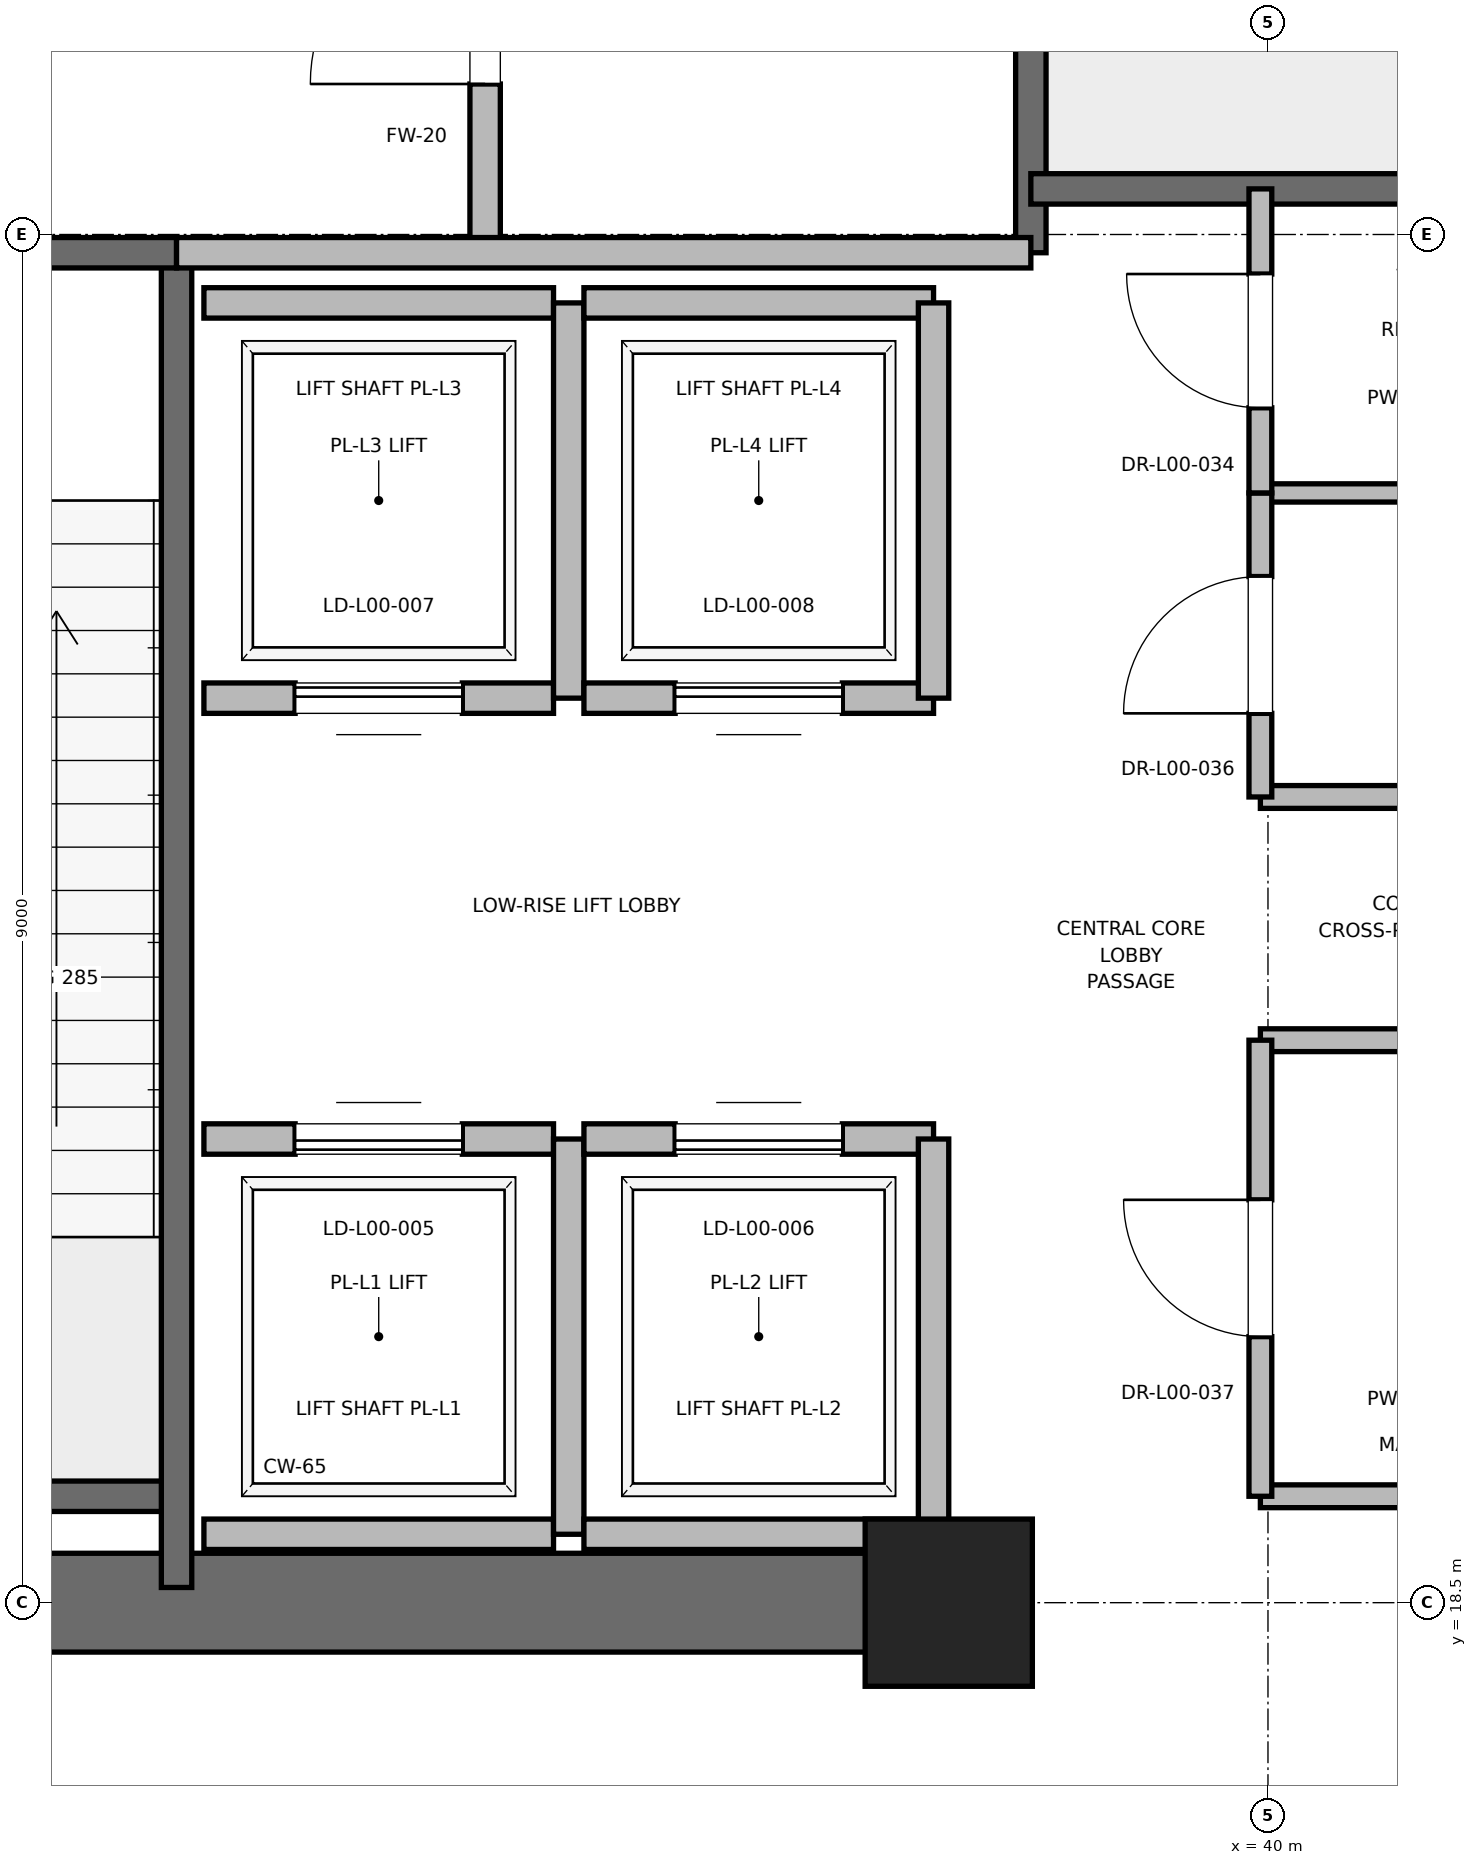
"""IFC4 building model, lengths in metres.
Left out: names, types, materials, properties, quantities, classifications, styles, units other than length and angle.
Written with IfcOpenShell. Run it as: python <this file> out.ifc"""

import sys

from ifc_helpers import new_model, si_unit, direction, frame, frame_2d, origin, origin_2d, place, context, subcontext, project, spatial, rectangle, extrude, element, fill, save


model = new_model("IFC4")
c1 = context("Model", 3, precision=1e-05, world=origin(), true_north=direction((0.0, 1.0)))
c2 = subcontext(c1, "Body", "Model", "MODEL_VIEW")
j1 = project(units=[si_unit("LENGTHUNIT", "METRE"), si_unit("PLANEANGLEUNIT", "RADIAN")], contexts=[c1])
p1 = place(None, origin())
s1 = spatial("IfcSite", under=j1, at=p1, CompositionType="ELEMENT")
p2 = place(p1, origin())
s2 = spatial("IfcBuilding", under=s1, at=p2, CompositionType="ELEMENT")
p3 = place(p2, origin())
s3 = spatial("IfcBuildingStorey", under=s2, at=p3, CompositionType="ELEMENT", Elevation=0.0)
p4 = place(p3, frame((37.9, 18.5, 0.0), z_axis=(0.0, 0.0, 1.0), x_axis=(1.0, 0.0, 0.0)))
e1 = element("IfcColumn", 1, at=p4, inside=s3, PredefinedType="PILASTER", context=c2, shape_type="SweptSolid", body=[
    extrude(rectangle(XDim=1.1, YDim=1.1, at=origin_2d()), origin(), (0.0, 0.0, 1.0), 6.0),
])
p5 = place(p3, frame((29.0, 18.5, 0.0), z_axis=(0.0, 0.0, 1.0), x_axis=(1.0, 0.0, 0.0)))
e2 = element("IfcWall", 2, at=p5, inside=s3, PredefinedType="SHEAR", context=c2, shape_type="SweptSolid", body=[
    extrude(rectangle(XDim=9.2, YDim=0.65, at=frame_2d((4.6, 0.0))), origin(), (0.0, 0.0, 1.0), 5.72),
])
p6 = place(p3, frame((29.7, 19.2, 0.0), z_axis=(0.0, 0.0, 1.0), x_axis=(1.0, 0.0, 0.0)))
e3 = element("IfcWall", 3, at=p6, inside=s3, PredefinedType="SOLIDWALL", context=c2, shape_type="SweptSolid", body=[
    extrude(rectangle(XDim=3.12, YDim=0.2, at=frame_2d((1.56, 0.0))), origin(), (0.0, 0.0, 1.0), 5.72),
])
p7 = place(p3, frame((32.82, 18.6, 0.0), z_axis=(0.0, 0.0, 1.0), x_axis=(0.0, 1.0, 0.0)))
e4 = element("IfcWall", 4, at=p7, inside=s3, PredefinedType="SOLIDWALL", context=c2, shape_type="SweptSolid", body=[
    extrude(rectangle(XDim=8.78, YDim=0.2, at=frame_2d((4.39, 0.0))), origin(), (0.0, 0.0, 1.0), 5.72),
])
p8 = place(p3, frame((29.7, 27.38, 0.0), z_axis=(0.0, 0.0, 1.0), x_axis=(1.0, 0.0, 0.0)))
e5 = element("IfcWall", 5, at=p8, inside=s3, PredefinedType="SOLIDWALL", context=c2, shape_type="SweptSolid", body=[
    extrude(rectangle(XDim=3.12, YDim=0.2, at=frame_2d((1.56, 0.0))), origin(), (0.0, 0.0, 1.0), 5.72),
])
p9 = place(p8, frame((1.01, 0.0, 0.0)))
e6 = element("IfcOpeningElement", 6, at=p9, cuts=e5, PredefinedType="OPENING", context=c2, shape_type="SweptSolid", body=[
    extrude(rectangle(XDim=1.1, YDim=2.15, at=frame_2d((0.55, 1.075))), frame((0.0, 0.1, 0.0), z_axis=(0.0, -1.0, 0.0), x_axis=(1.0, 0.0, 0.0)), (0.0, 0.0, 1.0), 0.2),
])
p10 = place(p3, frame((38.44, 27.38, 0.0), z_axis=(0.0, 0.0, 1.0), x_axis=(0.0, 1.0, 0.0)))
e7 = element("IfcWall", 7, at=p10, inside=s3, PredefinedType="SOLIDWALL", context=c2, shape_type="SweptSolid", body=[
    extrude(rectangle(XDim=8.87, YDim=0.2, at=frame_2d((4.435, 0.0))), origin(), (0.0, 0.0, 1.0), 5.72),
])
p11 = place(p3, frame((38.44, 27.8, 0.0), z_axis=(0.0, 0.0, 1.0), x_axis=(1.0, 0.0, 0.0)))
e8 = element("IfcWall", 8, at=p11, inside=s3, PredefinedType="SOLIDWALL", context=c2, shape_type="SweptSolid", body=[
    extrude(rectangle(XDim=3.32, YDim=0.2, at=frame_2d((1.66, 0.0))), origin(), (0.0, 0.0, 1.0), 5.72),
])
p12 = place(p3, frame((34.85, 27.38, 0.0), z_axis=(0.0, 0.0, 1.0), x_axis=(0.0, 1.0, 0.0)))
e9 = element("IfcWall", 9, at=p12, inside=s3, PredefinedType="PARTITIONING", context=c2, shape_type="SweptSolid", body=[
    extrude(rectangle(XDim=3.37, YDim=0.2, at=frame_2d((1.685, 0.0))), origin(), (0.0, 0.0, 1.0), 5.72),
])
p13 = place(p12, frame((1.11, 0.0, 0.0)))
e10 = element("IfcOpeningElement", 10, at=p13, cuts=e9, PredefinedType="OPENING", context=c2, shape_type="SweptSolid", body=[
    extrude(rectangle(XDim=1.15, YDim=2.2, at=frame_2d((0.575, 1.1))), frame((0.0, 0.1, 0.0), z_axis=(0.0, -1.0, 0.0), x_axis=(1.0, 0.0, 0.0)), (0.0, 0.0, 1.0), 0.2),
])
p14 = place(p3, frame((32.82, 27.38, 0.0), z_axis=(0.0, 0.0, 1.0), x_axis=(1.0, 0.0, 0.0)))
e11 = element("IfcWall", 11, at=p14, inside=s3, PredefinedType="PARTITIONING", context=c2, shape_type="SweptSolid", body=[
    extrude(rectangle(XDim=5.62, YDim=0.2, at=frame_2d((2.81, 0.0))), origin(), (0.0, 0.0, 1.0), 5.72),
])
p15 = place(p3, frame((33.0, 18.95, 0.0), z_axis=(0.0, 0.0, 1.0), x_axis=(1.0, 0.0, 0.0)))
e12 = element("IfcWall", 12, at=p15, inside=s3, PredefinedType="SOLIDWALL", context=c2, shape_type="SweptSolid", body=[
    extrude(rectangle(XDim=2.3, YDim=0.2, at=frame_2d((1.15, 0.0))), origin(), (0.0, 0.0, 1.0), 5.72),
])
p16 = place(p3, frame((35.3, 21.55, 0.0), z_axis=(0.0, 0.0, 1.0), x_axis=(-1.0, 0.0, 0.0)))
e13 = element("IfcWall", 13, at=p16, inside=s3, PredefinedType="SOLIDWALL", context=c2, shape_type="SweptSolid", body=[
    extrude(rectangle(XDim=2.3, YDim=0.2, at=frame_2d((1.15, 0.0))), origin(), (0.0, 0.0, 1.0), 5.72),
])
p17 = place(p16, frame((0.6, 0.0, 0.0)))
e14 = element("IfcOpeningElement", 14, at=p17, cuts=e13, PredefinedType="OPENING", context=c2, shape_type="SweptSolid", body=[
    extrude(rectangle(XDim=1.1, YDim=2.2, at=frame_2d((0.55, 1.1))), frame((0.0, 0.1, 0.0), z_axis=(0.0, -1.0, 0.0), x_axis=(1.0, 0.0, 0.0)), (0.0, 0.0, 1.0), 0.2),
])
p18 = place(p3, frame((35.4, 18.95, 0.0), z_axis=(0.0, 0.0, 1.0), x_axis=(0.0, 1.0, 0.0)))
e15 = element("IfcWall", 15, at=p18, inside=s3, PredefinedType="SOLIDWALL", context=c2, shape_type="SweptSolid", body=[
    extrude(rectangle(XDim=2.6, YDim=0.2, at=frame_2d((1.3, 0.0))), origin(), (0.0, 0.0, 1.0), 5.72),
])
p19 = place(p3, frame((35.5, 18.95, 0.0), z_axis=(0.0, 0.0, 1.0), x_axis=(1.0, 0.0, 0.0)))
e16 = element("IfcWall", 16, at=p19, inside=s3, PredefinedType="SOLIDWALL", context=c2, shape_type="SweptSolid", body=[
    extrude(rectangle(XDim=2.3, YDim=0.2, at=frame_2d((1.15, 0.0))), origin(), (0.0, 0.0, 1.0), 4.5),
])
p20 = place(p3, frame((37.8, 21.55, 0.0), z_axis=(0.0, 0.0, 1.0), x_axis=(-1.0, 0.0, 0.0)))
e17 = element("IfcWall", 17, at=p20, inside=s3, PredefinedType="SOLIDWALL", context=c2, shape_type="SweptSolid", body=[
    extrude(rectangle(XDim=2.3, YDim=0.2, at=frame_2d((1.15, 0.0))), origin(), (0.0, 0.0, 1.0), 5.72),
])
p21 = place(p20, frame((0.6, 0.0, 0.0)))
e18 = element("IfcOpeningElement", 18, at=p21, cuts=e17, PredefinedType="OPENING", context=c2, shape_type="SweptSolid", body=[
    extrude(rectangle(XDim=1.1, YDim=2.2, at=frame_2d((0.55, 1.1))), frame((0.0, 0.1, 0.0), z_axis=(0.0, -1.0, 0.0), x_axis=(1.0, 0.0, 0.0)), (0.0, 0.0, 1.0), 0.2),
])
p22 = place(p3, frame((37.8, 18.95, 0.0), z_axis=(0.0, 0.0, 1.0), x_axis=(0.0, 1.0, 0.0)))
e19 = element("IfcWall", 19, at=p22, inside=s3, PredefinedType="SOLIDWALL", context=c2, shape_type="SweptSolid", body=[
    extrude(rectangle(XDim=2.6, YDim=0.2, at=frame_2d((1.3, 0.0))), origin(), (0.0, 0.0, 1.0), 4.5),
])
p23 = place(p3, frame((33.0, 24.45, 0.0), z_axis=(0.0, 0.0, 1.0), x_axis=(1.0, 0.0, 0.0)))
e20 = element("IfcWall", 20, at=p23, inside=s3, PredefinedType="SOLIDWALL", context=c2, shape_type="SweptSolid", body=[
    extrude(rectangle(XDim=2.3, YDim=0.2, at=frame_2d((1.15, 0.0))), origin(), (0.0, 0.0, 1.0), 5.72),
])
p24 = place(p23, frame((0.6, 0.0, 0.0)))
e21 = element("IfcOpeningElement", 21, at=p24, cuts=e20, PredefinedType="OPENING", context=c2, shape_type="SweptSolid", body=[
    extrude(rectangle(XDim=1.1, YDim=2.2, at=frame_2d((0.55, 1.1))), frame((0.0, 0.1, 0.0), z_axis=(0.0, -1.0, 0.0), x_axis=(1.0, 0.0, 0.0)), (0.0, 0.0, 1.0), 0.2),
])
p25 = place(p3, frame((35.3, 27.05, 0.0), z_axis=(0.0, 0.0, 1.0), x_axis=(-1.0, 0.0, 0.0)))
e22 = element("IfcWall", 22, at=p25, inside=s3, PredefinedType="SOLIDWALL", context=c2, shape_type="SweptSolid", body=[
    extrude(rectangle(XDim=2.3, YDim=0.2, at=frame_2d((1.15, 0.0))), origin(), (0.0, 0.0, 1.0), 5.72),
])
p26 = place(p3, frame((35.4, 24.45, 0.0), z_axis=(0.0, 0.0, 1.0), x_axis=(0.0, 1.0, 0.0)))
e23 = element("IfcWall", 23, at=p26, inside=s3, PredefinedType="SOLIDWALL", context=c2, shape_type="SweptSolid", body=[
    extrude(rectangle(XDim=2.6, YDim=0.2, at=frame_2d((1.3, 0.0))), origin(), (0.0, 0.0, 1.0), 5.72),
])
p27 = place(p3, frame((35.5, 24.45, 0.0), z_axis=(0.0, 0.0, 1.0), x_axis=(1.0, 0.0, 0.0)))
e24 = element("IfcWall", 24, at=p27, inside=s3, PredefinedType="SOLIDWALL", context=c2, shape_type="SweptSolid", body=[
    extrude(rectangle(XDim=2.3, YDim=0.2, at=frame_2d((1.15, 0.0))), origin(), (0.0, 0.0, 1.0), 5.72),
])
p28 = place(p27, frame((0.6, 0.0, 0.0)))
e25 = element("IfcOpeningElement", 25, at=p28, cuts=e24, PredefinedType="OPENING", context=c2, shape_type="SweptSolid", body=[
    extrude(rectangle(XDim=1.1, YDim=2.2, at=frame_2d((0.55, 1.1))), frame((0.0, 0.1, 0.0), z_axis=(0.0, -1.0, 0.0), x_axis=(1.0, 0.0, 0.0)), (0.0, 0.0, 1.0), 0.2),
])
p29 = place(p3, frame((37.8, 27.05, 0.0), z_axis=(0.0, 0.0, 1.0), x_axis=(-1.0, 0.0, 0.0)))
e26 = element("IfcWall", 26, at=p29, inside=s3, PredefinedType="SOLIDWALL", context=c2, shape_type="SweptSolid", body=[
    extrude(rectangle(XDim=2.3, YDim=0.2, at=frame_2d((1.15, 0.0))), origin(), (0.0, 0.0, 1.0), 5.72),
])
p30 = place(p3, frame((37.8, 24.45, 0.0), z_axis=(0.0, 0.0, 1.0), x_axis=(0.0, 1.0, 0.0)))
e27 = element("IfcWall", 27, at=p30, inside=s3, PredefinedType="SOLIDWALL", context=c2, shape_type="SweptSolid", body=[
    extrude(rectangle(XDim=2.6, YDim=0.2, at=frame_2d((1.3, 0.0))), origin(), (0.0, 0.0, 1.0), 5.72),
])
for number, where, z_axis, x_axis in (
    (28, (39.95, 19.2, 0.0), (0.0, 0.0, 1.0), (1.0, 0.0, 0.0)),
    (29, (39.95, 22.2, 0.0), (0.0, 0.0, 1.0), (1.0, 0.0, 0.0)),
    (30, (39.95, 23.8, 0.0), (0.0, 0.0, 1.0), (1.0, 0.0, 0.0)),
):
    element("IfcWall", number, at=place(p3, frame(where, z_axis=z_axis, x_axis=x_axis)), inside=s3, PredefinedType="PARTITIONING", context=c2, shape_type="SweptSolid", body=[
        extrude(rectangle(XDim=1.81, YDim=0.15, at=frame_2d((0.905, 0.0))), origin(), (0.0, 0.0, 1.0), 2.85),
    ])
p31 = place(p3, frame((39.95, 25.8, 0.0), z_axis=(0.0, 0.0, 1.0), x_axis=(1.0, 0.0, 0.0)))
e31 = element("IfcWall", 31, at=p31, inside=s3, PredefinedType="PARTITIONING", context=c2, shape_type="SweptSolid", body=[
    extrude(rectangle(XDim=1.81, YDim=0.12, at=frame_2d((0.905, 0.0))), origin(), (0.0, 0.0, 1.0), 2.85),
])
p32 = place(p3, frame((39.95, 19.2, 0.0), z_axis=(0.0, 0.0, 1.0), x_axis=(0.0, 1.0, 0.0)))
e32 = element("IfcWall", 32, at=p32, inside=s3, PredefinedType="PARTITIONING", context=c2, shape_type="SweptSolid", body=[
    extrude(rectangle(XDim=3.0, YDim=0.15, at=frame_2d((1.5, 0.0))), origin(), (0.0, 0.0, 1.0), 2.85),
])
p33 = place(p32, frame((1.05, 0.0, 0.0)))
e33 = element("IfcOpeningElement", 33, at=p33, cuts=e32, PredefinedType="OPENING", context=c2, shape_type="SweptSolid", body=[
    extrude(rectangle(XDim=0.9, YDim=2.1, at=frame_2d((0.45, 1.05))), frame((0.0, 0.075, 0.0), z_axis=(0.0, -1.0, 0.0), x_axis=(1.0, 0.0, 0.0)), (0.0, 0.0, 1.0), 0.15),
])
p34 = place(p3, frame((39.95, 23.8, 0.0), z_axis=(0.0, 0.0, 1.0), x_axis=(0.0, 1.0, 0.0)))
e34 = element("IfcWall", 34, at=p34, inside=s3, PredefinedType="PARTITIONING", context=c2, shape_type="SweptSolid", body=[
    extrude(rectangle(XDim=2.0, YDim=0.15, at=frame_2d((1.0, 0.0))), origin(), (0.0, 0.0, 1.0), 2.85),
])
p35 = place(p34, frame((0.55, 0.0, 0.0)))
e35 = element("IfcOpeningElement", 35, at=p35, cuts=e34, PredefinedType="OPENING", context=c2, shape_type="SweptSolid", body=[
    extrude(rectangle(XDim=0.9, YDim=2.1, at=frame_2d((0.45, 1.05))), frame((0.0, 0.075, 0.0), z_axis=(0.0, -1.0, 0.0), x_axis=(1.0, 0.0, 0.0)), (0.0, 0.0, 1.0), 0.15),
])
p36 = place(p3, frame((39.95, 25.8, 0.0), z_axis=(0.0, 0.0, 1.0), x_axis=(0.0, 1.0, 0.0)))
e36 = element("IfcWall", 36, at=p36, inside=s3, PredefinedType="PARTITIONING", context=c2, shape_type="SweptSolid", body=[
    extrude(rectangle(XDim=2.0, YDim=0.15, at=frame_2d((1.0, 0.0))), origin(), (0.0, 0.0, 1.0), 2.85),
])
p37 = place(p36, frame((0.56, 0.0, 0.0)))
e37 = element("IfcOpeningElement", 37, at=p37, cuts=e36, PredefinedType="OPENING", context=c2, shape_type="SweptSolid", body=[
    extrude(rectangle(XDim=0.88, YDim=2.1, at=frame_2d((0.44, 1.05))), frame((0.0, 0.075, 0.0), z_axis=(0.0, -1.0, 0.0), x_axis=(1.0, 0.0, 0.0)), (0.0, 0.0, 1.0), 0.15),
])
p38 = place(p13, origin())
e38 = element("IfcDoor", 38, at=p38, inside=s3, OperationType="SINGLE_SWING_LEFT", PredefinedType="DOOR", context=c2, shape_type="SweptSolid", body=[
    extrude(rectangle(XDim=1.15, YDim=2.2, at=frame_2d((0.575, 1.1))), frame((0.0, 0.025, 0.0), z_axis=(0.0, -1.0, 0.0), x_axis=(1.0, 0.0, 0.0)), (0.0, 0.0, 1.0), 0.05),
])
fill(e10, e38)
p39 = place(p17, origin())
e39 = element("IfcDoor", 39, at=p39, inside=s3, OperationType="SLIDING_TO_RIGHT", PredefinedType="DOOR", context=c2, shape_type="SweptSolid", body=[
    extrude(rectangle(XDim=1.1, YDim=2.2, at=frame_2d((0.55, 1.1))), frame((0.0, 0.025, 0.0), z_axis=(0.0, -1.0, 0.0), x_axis=(1.0, 0.0, 0.0)), (0.0, 0.0, 1.0), 0.05),
])
fill(e14, e39)
p40 = place(p21, origin())
e40 = element("IfcDoor", 40, at=p40, inside=s3, OperationType="SLIDING_TO_RIGHT", PredefinedType="DOOR", context=c2, shape_type="SweptSolid", body=[
    extrude(rectangle(XDim=1.1, YDim=2.2, at=frame_2d((0.55, 1.1))), frame((0.0, 0.025, 0.0), z_axis=(0.0, -1.0, 0.0), x_axis=(1.0, 0.0, 0.0)), (0.0, 0.0, 1.0), 0.05),
])
fill(e18, e40)
p41 = place(p24, origin())
e41 = element("IfcDoor", 41, at=p41, inside=s3, OperationType="SLIDING_TO_RIGHT", PredefinedType="DOOR", context=c2, shape_type="SweptSolid", body=[
    extrude(rectangle(XDim=1.1, YDim=2.2, at=frame_2d((0.55, 1.1))), frame((0.0, 0.025, 0.0), z_axis=(0.0, -1.0, 0.0), x_axis=(1.0, 0.0, 0.0)), (0.0, 0.0, 1.0), 0.05),
])
fill(e21, e41)
p42 = place(p28, origin())
e42 = element("IfcDoor", 42, at=p42, inside=s3, OperationType="SLIDING_TO_RIGHT", PredefinedType="DOOR", context=c2, shape_type="SweptSolid", body=[
    extrude(rectangle(XDim=1.1, YDim=2.2, at=frame_2d((0.55, 1.1))), frame((0.0, 0.025, 0.0), z_axis=(0.0, -1.0, 0.0), x_axis=(1.0, 0.0, 0.0)), (0.0, 0.0, 1.0), 0.05),
])
fill(e25, e42)
p43 = place(p33, origin())
e43 = element("IfcDoor", 43, at=p43, inside=s3, OperationType="SINGLE_SWING_RIGHT", PredefinedType="DOOR", context=c2, shape_type="SweptSolid", body=[
    extrude(rectangle(XDim=0.9, YDim=2.1, at=frame_2d((0.45, 1.05))), frame((0.0, 0.025, 0.0), z_axis=(0.0, -1.0, 0.0), x_axis=(1.0, 0.0, 0.0)), (0.0, 0.0, 1.0), 0.05),
])
fill(e33, e43)
p44 = place(p35, origin())
e44 = element("IfcDoor", 44, at=p44, inside=s3, OperationType="SINGLE_SWING_LEFT", PredefinedType="DOOR", context=c2, shape_type="SweptSolid", body=[
    extrude(rectangle(XDim=0.9, YDim=2.1, at=frame_2d((0.45, 1.05))), frame((0.0, 0.025, 0.0), z_axis=(0.0, -1.0, 0.0), x_axis=(1.0, 0.0, 0.0)), (0.0, 0.0, 1.0), 0.05),
])
fill(e35, e44)
p45 = place(p37, origin())
e45 = element("IfcDoor", 45, at=p45, inside=s3, OperationType="SINGLE_SWING_RIGHT", PredefinedType="DOOR", context=c2, shape_type="SweptSolid", body=[
    extrude(rectangle(XDim=0.88, YDim=2.1, at=frame_2d((0.44, 1.05))), frame((0.0, 0.025, 0.0), z_axis=(0.0, -1.0, 0.0), x_axis=(1.0, 0.0, 0.0)), (0.0, 0.0, 1.0), 0.05),
])
fill(e37, e45)
save(model, sys.argv[1])
